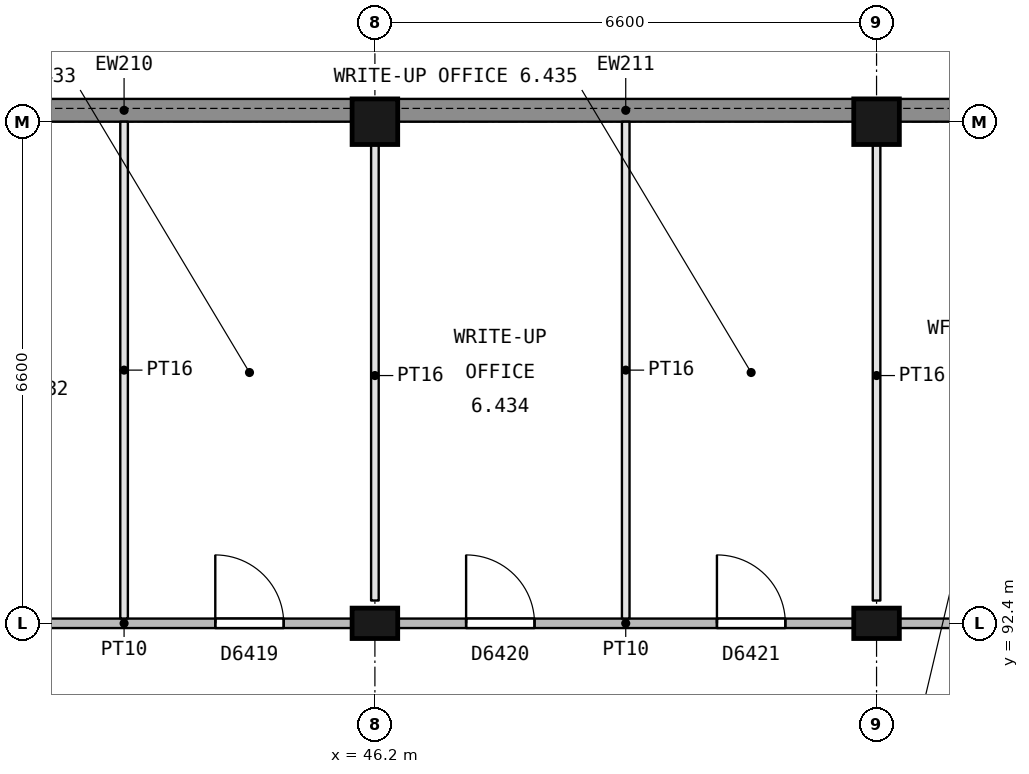
"""IFC4 building model, lengths in metres.
Left out: names, types, materials, properties, quantities, classifications, styles, units other than length and angle.
Written with IfcOpenShell. Run it as: python <this file> out.ifc"""

import sys

from ifc_helpers import new_model, si_unit, direction, frame, frame_2d, origin, origin_2d, place, context, subcontext, project, spatial, rectangle, extrude, element, fill, save


model = new_model("IFC4")
c1 = context("Model", 3, precision=1e-05, world=origin(), true_north=direction((0.0, 1.0)))
c2 = subcontext(c1, "Body", "Model", "MODEL_VIEW")
j1 = project(units=[si_unit("LENGTHUNIT", "METRE"), si_unit("PLANEANGLEUNIT", "RADIAN")], contexts=[c1])
p1 = place(None, origin())
s1 = spatial("IfcSite", under=j1, at=p1, CompositionType="ELEMENT")
p2 = place(p1, origin())
s2 = spatial("IfcBuilding", under=s1, at=p2, CompositionType="ELEMENT")
p3 = place(p2, frame((0.0, 0.0, 18.9)))
s3 = spatial("IfcBuildingStorey", under=s2, at=p3, CompositionType="ELEMENT", Elevation=18.9)
p4 = place(p3, frame((46.2, 92.4, 0.0), z_axis=(0.0, 0.0, 1.0), x_axis=(1.0, 0.0, 0.0)))
e1 = element("IfcColumn", 1, at=p4, inside=s3, PredefinedType="COLUMN", context=c2, shape_type="SweptSolid", body=[
    extrude(rectangle(XDim=0.6, YDim=0.4, at=origin_2d()), origin(), (0.0, 0.0, 1.0), 4.25),
])
p5 = place(p3, frame((46.2, 99.0, 0.0), z_axis=(0.0, 0.0, 1.0), x_axis=(1.0, 0.0, 0.0)))
e2 = element("IfcColumn", 2, at=p5, inside=s3, PredefinedType="COLUMN", context=c2, shape_type="SweptSolid", body=[
    extrude(rectangle(XDim=0.6, YDim=0.6, at=origin_2d()), origin(), (0.0, 0.0, 1.0), 4.25),
])
p6 = place(p3, frame((52.8, 92.4, 0.0), z_axis=(0.0, 0.0, 1.0), x_axis=(1.0, 0.0, 0.0)))
e3 = element("IfcColumn", 3, at=p6, inside=s3, PredefinedType="COLUMN", context=c2, shape_type="SweptSolid", body=[
    extrude(rectangle(XDim=0.6, YDim=0.4, at=origin_2d()), origin(), (0.0, 0.0, 1.0), 4.25),
])
p7 = place(p3, frame((52.8, 99.0, 0.0), z_axis=(0.0, 0.0, 1.0), x_axis=(1.0, 0.0, 0.0)))
e4 = element("IfcColumn", 4, at=p7, inside=s3, PredefinedType="COLUMN", context=c2, shape_type="SweptSolid", body=[
    extrude(rectangle(XDim=0.6, YDim=0.6, at=origin_2d()), origin(), (0.0, 0.0, 1.0), 4.25),
])
for number, where, z_axis, x_axis in (
    (5, (39.9, 99.15, 0.0), (0.0, 0.0, 1.0), (1.0, 0.0, 0.0)),
    (6, (46.5, 99.15, 0.0), (0.0, 0.0, 1.0), (1.0, 0.0, 0.0)),
    (7, (53.1, 99.15, 0.0), (0.0, 0.0, 1.0), (1.0, 0.0, 0.0)),
):
    element("IfcWall", number, at=place(p3, frame(where, z_axis=z_axis, x_axis=x_axis)), inside=s3, PredefinedType="STANDARD", context=c2, shape_type="SweptSolid", body=[
        extrude(rectangle(XDim=6.0, YDim=0.3, at=frame_2d((3.0, 0.0))), origin(), (0.0, 0.0, 1.0), 3.65),
    ])
p8 = place(p3, frame((39.9, 92.4, 0.0), z_axis=(0.0, 0.0, 1.0), x_axis=(1.0, 0.0, 0.0)))
e8 = element("IfcWall", 8, at=p8, inside=s3, PredefinedType="PARTITIONING", context=c2, shape_type="SweptSolid", body=[
    extrude(rectangle(XDim=6.0, YDim=0.125, at=frame_2d((3.0, 0.0))), origin(), (0.0, 0.0, 1.0), 3.65),
])
p9 = place(p8, frame((0.9, 0.0, 0.0)))
e9 = element("IfcOpeningElement", 9, at=p9, cuts=e8, PredefinedType="OPENING", context=c2, shape_type="SweptSolid", body=[
    extrude(rectangle(XDim=0.9, YDim=2.1, at=frame_2d((0.45, 1.05))), frame((0.0, 0.073, 0.0), z_axis=(0.0, -1.0, 0.0), x_axis=(1.0, 0.0, 0.0)), (0.0, 0.0, 1.0), 0.145),
])
p10 = place(p8, frame((4.2, 0.0, 0.0)))
e10 = element("IfcOpeningElement", 10, at=p10, cuts=e8, PredefinedType="OPENING", context=c2, shape_type="SweptSolid", body=[
    extrude(rectangle(XDim=0.9, YDim=2.1, at=frame_2d((0.45, 1.05))), frame((0.0, 0.073, 0.0), z_axis=(0.0, -1.0, 0.0), x_axis=(1.0, 0.0, 0.0)), (0.0, 0.0, 1.0), 0.145),
])
p11 = place(p3, frame((46.5, 92.4, 0.0), z_axis=(0.0, 0.0, 1.0), x_axis=(1.0, 0.0, 0.0)))
e11 = element("IfcWall", 11, at=p11, inside=s3, PredefinedType="PARTITIONING", context=c2, shape_type="SweptSolid", body=[
    extrude(rectangle(XDim=6.0, YDim=0.125, at=frame_2d((3.0, 0.0))), origin(), (0.0, 0.0, 1.0), 3.65),
])
p12 = place(p11, frame((0.9, 0.0, 0.0)))
e12 = element("IfcOpeningElement", 12, at=p12, cuts=e11, PredefinedType="OPENING", context=c2, shape_type="SweptSolid", body=[
    extrude(rectangle(XDim=0.9, YDim=2.1, at=frame_2d((0.45, 1.05))), frame((0.0, 0.073, 0.0), z_axis=(0.0, -1.0, 0.0), x_axis=(1.0, 0.0, 0.0)), (0.0, 0.0, 1.0), 0.145),
])
p13 = place(p11, frame((4.2, 0.0, 0.0)))
e13 = element("IfcOpeningElement", 13, at=p13, cuts=e11, PredefinedType="OPENING", context=c2, shape_type="SweptSolid", body=[
    extrude(rectangle(XDim=0.9, YDim=2.1, at=frame_2d((0.45, 1.05))), frame((0.0, 0.073, 0.0), z_axis=(0.0, -1.0, 0.0), x_axis=(1.0, 0.0, 0.0)), (0.0, 0.0, 1.0), 0.145),
])
p14 = place(p3, frame((53.1, 92.4, 0.0), z_axis=(0.0, 0.0, 1.0), x_axis=(1.0, 0.0, 0.0)))
e14 = element("IfcWall", 14, at=p14, inside=s3, PredefinedType="PARTITIONING", context=c2, shape_type="SweptSolid", body=[
    extrude(rectangle(XDim=6.0, YDim=0.125, at=frame_2d((3.0, 0.0))), origin(), (0.0, 0.0, 1.0), 3.65),
])
p15 = place(p14, frame((0.9, 0.0, 0.0)))
e15 = element("IfcOpeningElement", 15, at=p15, cuts=e14, PredefinedType="OPENING", context=c2, shape_type="SweptSolid", body=[
    extrude(rectangle(XDim=0.9, YDim=2.1, at=frame_2d((0.45, 1.05))), frame((0.0, 0.073, 0.0), z_axis=(0.0, -1.0, 0.0), x_axis=(1.0, 0.0, 0.0)), (0.0, 0.0, 1.0), 0.145),
])
p16 = place(p14, frame((4.2, 0.0, 0.0)))
e16 = element("IfcOpeningElement", 16, at=p16, cuts=e14, PredefinedType="OPENING", context=c2, shape_type="SweptSolid", body=[
    extrude(rectangle(XDim=0.9, YDim=2.1, at=frame_2d((0.45, 1.05))), frame((0.0, 0.073, 0.0), z_axis=(0.0, -1.0, 0.0), x_axis=(1.0, 0.0, 0.0)), (0.0, 0.0, 1.0), 0.145),
])
p17 = place(p3, frame((42.9, 92.463, 0.0), z_axis=(0.0, 0.0, 1.0), x_axis=(0.0, 1.0, 0.0)))
e17 = element("IfcWall", 17, at=p17, inside=s3, PredefinedType="PARTITIONING", context=c2, shape_type="SweptSolid", body=[
    extrude(rectangle(XDim=6.537, YDim=0.1, at=frame_2d((3.269, 0.0))), origin(), (0.0, 0.0, 1.0), 3.65),
])
p18 = place(p3, frame((46.2, 92.7, 0.0), z_axis=(0.0, 0.0, 1.0), x_axis=(0.0, 1.0, 0.0)))
e18 = element("IfcWall", 18, at=p18, inside=s3, PredefinedType="PARTITIONING", context=c2, shape_type="SweptSolid", body=[
    extrude(rectangle(XDim=6.0, YDim=0.1, at=frame_2d((3.0, 0.0))), origin(), (0.0, 0.0, 1.0), 3.65),
])
p19 = place(p3, frame((49.5, 92.463, 0.0), z_axis=(0.0, 0.0, 1.0), x_axis=(0.0, 1.0, 0.0)))
e19 = element("IfcWall", 19, at=p19, inside=s3, PredefinedType="PARTITIONING", context=c2, shape_type="SweptSolid", body=[
    extrude(rectangle(XDim=6.537, YDim=0.1, at=frame_2d((3.269, 0.0))), origin(), (0.0, 0.0, 1.0), 3.65),
])
p20 = place(p3, frame((52.8, 92.7, 0.0), z_axis=(0.0, 0.0, 1.0), x_axis=(0.0, 1.0, 0.0)))
e20 = element("IfcWall", 20, at=p20, inside=s3, PredefinedType="PARTITIONING", context=c2, shape_type="SweptSolid", body=[
    extrude(rectangle(XDim=6.0, YDim=0.1, at=frame_2d((3.0, 0.0))), origin(), (0.0, 0.0, 1.0), 3.65),
])
p21 = place(p10, origin())
e21 = element("IfcDoor", 21, at=p21, inside=s3, OperationType="SINGLE_SWING_LEFT", PredefinedType="DOOR", context=c2, shape_type="SweptSolid", body=[
    extrude(rectangle(XDim=0.9, YDim=2.1, at=frame_2d((0.45, 1.05))), frame((0.0, 0.025, 0.0), z_axis=(0.0, -1.0, 0.0), x_axis=(1.0, 0.0, 0.0)), (0.0, 0.0, 1.0), 0.05),
])
fill(e10, e21)
p22 = place(p12, origin())
e22 = element("IfcDoor", 22, at=p22, inside=s3, OperationType="SINGLE_SWING_LEFT", PredefinedType="DOOR", context=c2, shape_type="SweptSolid", body=[
    extrude(rectangle(XDim=0.9, YDim=2.1, at=frame_2d((0.45, 1.05))), frame((0.0, 0.025, 0.0), z_axis=(0.0, -1.0, 0.0), x_axis=(1.0, 0.0, 0.0)), (0.0, 0.0, 1.0), 0.05),
])
fill(e12, e22)
p23 = place(p13, origin())
e23 = element("IfcDoor", 23, at=p23, inside=s3, OperationType="SINGLE_SWING_LEFT", PredefinedType="DOOR", context=c2, shape_type="SweptSolid", body=[
    extrude(rectangle(XDim=0.9, YDim=2.1, at=frame_2d((0.45, 1.05))), frame((0.0, 0.025, 0.0), z_axis=(0.0, -1.0, 0.0), x_axis=(1.0, 0.0, 0.0)), (0.0, 0.0, 1.0), 0.05),
])
fill(e13, e23)
save(model, sys.argv[1])
